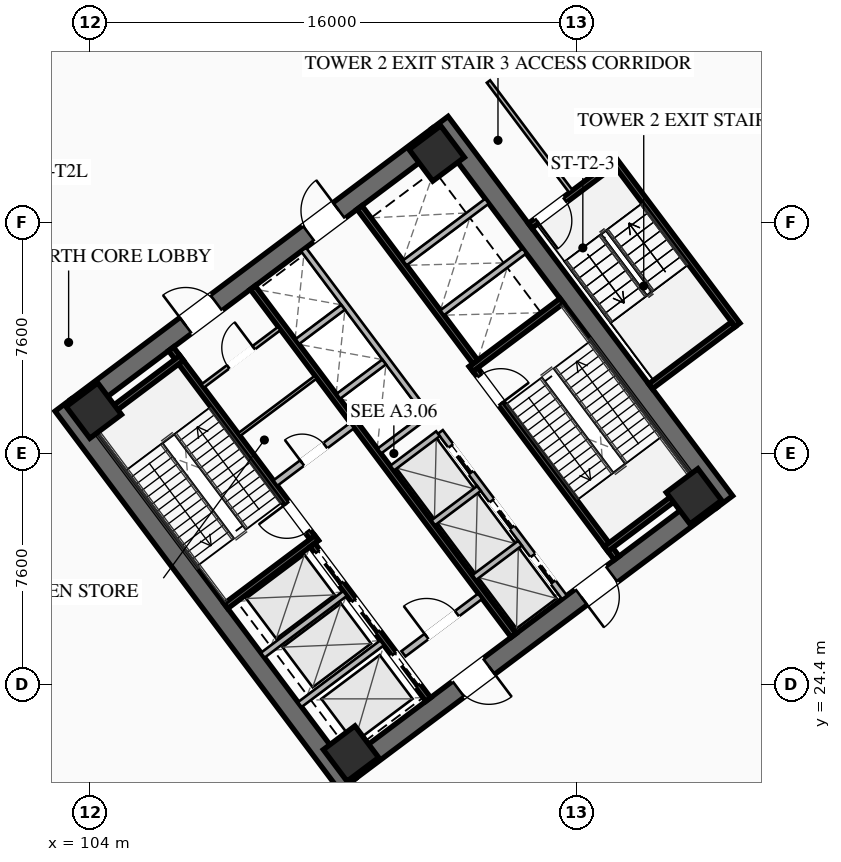
"""IFC4 building model, lengths in metres.
Left out: names, types, materials, properties, quantities, classifications, styles, units other than length and angle.
Written with IfcOpenShell. Run it as: python <this file> out.ifc"""

import sys

from ifc_helpers import new_model, si_unit, direction, frame, frame_2d, origin, origin_2d, place, context, subcontext, project, spatial, rectangle, hollow_rectangle, extrude, element, fill, save


model = new_model("IFC4")
c1 = context("Model", 3, precision=1e-05, world=origin(), true_north=direction((0.0, 1.0)))
c2 = subcontext(c1, "Body", "Model", "MODEL_VIEW")
j1 = project(units=[si_unit("LENGTHUNIT", "METRE"), si_unit("PLANEANGLEUNIT", "RADIAN")], contexts=[c1])
p1 = place(None, origin())
s1 = spatial("IfcSite", under=j1, at=p1, CompositionType="ELEMENT")
p2 = place(p1, origin())
s2 = spatial("IfcBuilding", under=s1, at=p2, CompositionType="ELEMENT")
p3 = place(p2, frame((0.0, 0.0, 10.2)))
s3 = spatial("IfcBuildingStorey", under=s2, at=p3, CompositionType="ELEMENT", Elevation=10.2)
for number, where, z_axis, x_axis in (
    (1, (112.476, 21.107, 0.0), (0.0, 0.0, 1.0), (-0.6, 0.8, 0.0)),
    (2, (115.524, 42.893, 0.0), (0.0, 0.0, 1.0), (0.6, -0.8, 0.0)),
):
    element("IfcWall", number, at=place(p3, frame(where, z_axis=z_axis, x_axis=x_axis)), inside=s3, PredefinedType="SHEAR", context=c2, shape_type="SweptSolid", body=[
        extrude(rectangle(XDim=15.6, YDim=0.65, at=frame_2d((7.8, 0.0))), origin(), (0.0, 0.0, 1.0), 5.4),
    ])
p4 = place(p3, frame((124.429, 30.478, 0.0), z_axis=(0.0, 0.0, 1.0), x_axis=(-0.799998028465, -0.600002628705, 0.0)))
e3 = element("IfcWall", 3, at=p4, inside=s3, PredefinedType="SHEAR", context=c2, shape_type="SweptSolid", body=[
    extrude(rectangle(XDim=14.86, YDim=0.65, at=frame_2d((7.43, 0.0))), origin(), (0.0, 0.0, 1.0), 5.4),
])
p5 = place(p4, frame((9.13, 0.0, 0.0)))
e4 = element("IfcOpeningElement", 4, at=p5, cuts=e3, PredefinedType="OPENING", context=c2, shape_type="SweptSolid", body=[
    extrude(rectangle(XDim=1.25, YDim=2.25, at=frame_2d((0.625, 1.125))), frame((0.0, 0.335, 0.0), z_axis=(0.0, -1.0, 0.0), x_axis=(1.0, 0.0, 0.0)), (0.0, 0.0, 1.0), 0.67),
])
p6 = place(p4, frame((4.08, 0.0, 0.0)))
e5 = element("IfcOpeningElement", 5, at=p6, cuts=e3, PredefinedType="OPENING", context=c2, shape_type="SweptSolid", body=[
    extrude(rectangle(XDim=1.25, YDim=2.25, at=frame_2d((0.625, 1.125))), frame((0.0, 0.335, 0.0), z_axis=(0.0, -1.0, 0.0), x_axis=(1.0, 0.0, 0.0)), (0.0, 0.0, 1.0), 0.67),
])
p7 = place(p3, frame((103.571, 33.522, 0.0), z_axis=(0.0, 0.0, 1.0), x_axis=(0.799998028465, 0.600002628705, 0.0)))
e6 = element("IfcWall", 6, at=p7, inside=s3, PredefinedType="SHEAR", context=c2, shape_type="SweptSolid", body=[
    extrude(rectangle(XDim=14.86, YDim=0.65, at=frame_2d((7.43, 0.0))), origin(), (0.0, 0.0, 1.0), 5.4),
])
p8 = place(p7, frame((4.48, 0.0, 0.0)))
e7 = element("IfcOpeningElement", 7, at=p8, cuts=e6, PredefinedType="OPENING", context=c2, shape_type="SweptSolid", body=[
    extrude(rectangle(XDim=1.25, YDim=2.25, at=frame_2d((0.625, 1.125))), frame((0.0, 0.335, 0.0), z_axis=(0.0, -1.0, 0.0), x_axis=(1.0, 0.0, 0.0)), (0.0, 0.0, 1.0), 0.67),
])
p9 = place(p7, frame((9.53, 0.0, 0.0)))
e8 = element("IfcOpeningElement", 8, at=p9, cuts=e6, PredefinedType="OPENING", context=c2, shape_type="SweptSolid", body=[
    extrude(rectangle(XDim=1.25, YDim=2.25, at=frame_2d((0.625, 1.125))), frame((0.0, 0.335, 0.0), z_axis=(0.0, -1.0, 0.0), x_axis=(1.0, 0.0, 0.0)), (0.0, 0.0, 1.0), 0.67),
])
for number, where, z_axis, x_axis in (
    (9, (112.59, 22.13, 0.0), (0.0, 0.0, 1.0), (0.8, 0.6, 0.0)),
    (10, (123.87, 30.59, 0.0), (0.0, 0.0, 1.0), (0.8, 0.6, 0.0)),
    (11, (115.41, 41.87, 0.0), (0.0, 0.0, 1.0), (0.8, 0.6, 0.0)),
    (12, (104.13, 33.41, 0.0), (0.0, 0.0, 1.0), (0.8, 0.6, 0.0)),
):
    element("IfcColumn", number, at=place(p3, frame(where, z_axis=z_axis, x_axis=x_axis)), inside=s3, PredefinedType="COLUMN", context=c2, shape_type="SweptSolid", body=[
        extrude(hollow_rectangle(XDim=1.3, YDim=1.3, WallThickness=0.05, at=origin_2d()), origin(), (0.0, 0.0, 1.0), 5.14),
    ])
p10 = place(p3, frame((111.44, 29.08, 0.0), z_axis=(0.0, 0.0, 1.0), x_axis=(-0.600009827119, 0.799992629566, 0.0)))
e13 = element("IfcWall", 13, at=p10, inside=s3, PredefinedType="SHEAR", context=c2, shape_type="SweptSolid", body=[
    extrude(rectangle(XDim=7.95, YDim=0.2, at=frame_2d((3.975, 0.0))), origin(), (0.0, 0.0, 1.0), 5.14),
])
p11 = place(p10, frame((0.45, 0.0, 0.0)))
e14 = element("IfcOpeningElement", 14, at=p11, cuts=e13, PredefinedType="OPENING", context=c2, shape_type="SweptSolid", body=[
    extrude(rectangle(XDim=1.15, YDim=2.2, at=frame_2d((0.575, 1.1))), frame((0.0, 0.11, 0.0), z_axis=(0.0, -1.0, 0.0), x_axis=(1.0, 0.0, 0.0)), (0.0, 0.0, 1.0), 0.22),
])
for number, where, z_axis, x_axis in (
    (15, (108.476, 26.982, 0.0), (0.0, 0.0, 1.0), (0.8, 0.6, 0.0)),
    (16, (104.036, 32.902, 0.0), (0.0, 0.0, 1.0), (0.8, 0.6, 0.0)),
):
    element("IfcWall", number, at=place(p3, frame(where, z_axis=z_axis, x_axis=x_axis)), inside=s3, PredefinedType="SHEAR", context=c2, shape_type="SweptSolid", body=[
        extrude(rectangle(XDim=3.73, YDim=0.2, at=frame_2d((1.865, 0.0))), origin(), (0.0, 0.0, 1.0), 5.14),
    ])
p12 = place(p3, frame((116.56, 34.92, 0.0), z_axis=(0.0, 0.0, 1.0), x_axis=(0.600009827119, -0.799992629566, 0.0)))
e17 = element("IfcWall", 17, at=p12, inside=s3, PredefinedType="SHEAR", context=c2, shape_type="SweptSolid", body=[
    extrude(rectangle(XDim=7.95, YDim=0.2, at=frame_2d((3.975, 0.0))), origin(), (0.0, 0.0, 1.0), 5.14),
])
p13 = place(p12, frame((0.45, 0.0, 0.0)))
e18 = element("IfcOpeningElement", 18, at=p13, cuts=e17, PredefinedType="OPENING", context=c2, shape_type="SweptSolid", body=[
    extrude(rectangle(XDim=1.15, YDim=2.2, at=frame_2d((0.575, 1.1))), frame((0.0, 0.11, 0.0), z_axis=(0.0, -1.0, 0.0), x_axis=(1.0, 0.0, 0.0)), (0.0, 0.0, 1.0), 0.22),
])
for number, where, z_axis, x_axis in (
    (19, (116.54, 34.78, 0.0), (0.0, 0.0, 1.0), (0.8, 0.6, 0.0)),
    (20, (120.98, 28.86, 0.0), (0.0, 0.0, 1.0), (0.8, 0.6, 0.0)),
):
    element("IfcWall", number, at=place(p3, frame(where, z_axis=z_axis, x_axis=x_axis)), inside=s3, PredefinedType="SHEAR", context=c2, shape_type="SweptSolid", body=[
        extrude(rectangle(XDim=3.73, YDim=0.2, at=frame_2d((1.865, 0.0))), origin(), (0.0, 0.0, 1.0), 5.14),
    ])
p14 = place(p3, frame((117.938, 26.016, 0.0), z_axis=(0.0, 0.0, 1.0), x_axis=(-0.600005463273, 0.799995902516, 0.0)))
e21 = element("IfcWall", 21, at=p14, inside=s3, PredefinedType="SHEAR", context=c2, shape_type="SweptSolid", body=[
    extrude(rectangle(XDim=14.3, YDim=0.2, at=frame_2d((7.15, 0.0))), origin(), (0.0, 0.0, 1.0), 5.14),
])
p15 = place(p3, frame((110.104, 31.028, 0.0), z_axis=(0.0, 0.0, 1.0), x_axis=(0.800018601094, 0.59997519774, 0.0)))
e22 = element("IfcWall", 22, at=p15, inside=s3, PredefinedType="SOLIDWALL", context=c2, shape_type="SweptSolid", body=[
    extrude(rectangle(XDim=3.15, YDim=0.22, at=frame_2d((1.575, 0.0))), origin(), (0.0, 0.0, 1.0), 2.71),
])
p16 = place(p15, frame((1.1, 0.0, 0.0)))
e23 = element("IfcOpeningElement", 23, at=p16, cuts=e22, PredefinedType="OPENING", context=c2, shape_type="SweptSolid", body=[
    extrude(rectangle(XDim=0.95, YDim=2.05, at=frame_2d((0.475, 1.025))), frame((0.0, 0.12, 0.0), z_axis=(0.0, -1.0, 0.0), x_axis=(1.0, 0.0, 0.0)), (0.0, 0.0, 1.0), 0.24),
])
p17 = place(p3, frame((114.316, 25.412, 0.0), z_axis=(0.0, 0.0, 1.0), x_axis=(0.800018601094, 0.59997519774, 0.0)))
e24 = element("IfcWall", 24, at=p17, inside=s3, PredefinedType="SOLIDWALL", context=c2, shape_type="SweptSolid", body=[
    extrude(rectangle(XDim=3.15, YDim=0.22, at=frame_2d((1.575, 0.0))), origin(), (0.0, 0.0, 1.0), 2.71),
])
p18 = place(p17, frame((0.95, 0.0, 0.0)))
e25 = element("IfcOpeningElement", 25, at=p18, cuts=e24, PredefinedType="OPENING", context=c2, shape_type="SweptSolid", body=[
    extrude(rectangle(XDim=1.25, YDim=2.25, at=frame_2d((0.625, 1.125))), frame((0.0, 0.12, 0.0), z_axis=(0.0, -1.0, 0.0), x_axis=(1.0, 0.0, 0.0)), (0.0, 0.0, 1.0), 0.24),
])
p19 = place(p3, frame((115.13, 23.91, 0.0), z_axis=(0.0, 0.0, 1.0), x_axis=(-0.599975393228, 0.800018454488, 0.0)))
e26 = element("IfcWall", 26, at=p19, inside=s3, PredefinedType="SHEAR", context=c2, shape_type="SweptSolid", body=[
    extrude(rectangle(XDim=6.35, YDim=0.2, at=frame_2d((3.175, 0.0))), origin(), (0.0, 0.0, 1.0), 5.14),
])
p20 = place(p19, frame((4.775, 0.0, 0.0)))
e27 = element("IfcOpeningElement", 27, at=p20, cuts=e26, PredefinedType="OPENING", context=c2, shape_type="SweptSolid", body=[
    extrude(rectangle(XDim=1.3, YDim=2.25, at=frame_2d((0.65, 1.125))), frame((0.0, 0.11, 0.0), z_axis=(0.0, -1.0, 0.0), x_axis=(1.0, 0.0, 0.0)), (0.0, 0.0, 1.0), 0.22),
])
p21 = place(p19, frame((2.775, 0.0, 0.0)))
e28 = element("IfcOpeningElement", 28, at=p21, cuts=e26, PredefinedType="OPENING", context=c2, shape_type="SweptSolid", body=[
    extrude(rectangle(XDim=1.3, YDim=2.25, at=frame_2d((0.65, 1.125))), frame((0.0, 0.11, 0.0), z_axis=(0.0, -1.0, 0.0), x_axis=(1.0, 0.0, 0.0)), (0.0, 0.0, 1.0), 0.22),
])
p22 = place(p19, frame((0.575, 0.0, 0.0)))
e29 = element("IfcOpeningElement", 29, at=p22, cuts=e26, PredefinedType="OPENING", context=c2, shape_type="SweptSolid", body=[
    extrude(rectangle(XDim=1.3, YDim=2.25, at=frame_2d((0.65, 1.125))), frame((0.0, 0.11, 0.0), z_axis=(0.0, -1.0, 0.0), x_axis=(1.0, 0.0, 0.0)), (0.0, 0.0, 1.0), 0.22),
])
for number, where, z_axis, x_axis in (
    (30, (110.906, 23.742, 0.0), (0.0, 0.0, 1.0), (0.8, 0.6, 0.0)),
    (31, (109.688, 25.366, 0.0), (0.0, 0.0, 1.0), (0.8, 0.6, 0.0)),
):
    element("IfcWall", number, at=place(p3, frame(where, z_axis=z_axis, x_axis=x_axis)), inside=s3, PredefinedType="SOLIDWALL", context=c2, shape_type="SweptSolid", body=[
        extrude(rectangle(XDim=3.38, YDim=0.2, at=frame_2d((1.69, 0.0))), origin(), (0.0, 0.0, 1.0), 5.14),
    ])
p23 = place(p3, frame((112.87, 40.09, 0.0), z_axis=(0.0, 0.0, 1.0), x_axis=(0.599975393228, -0.800018454488, 0.0)))
e32 = element("IfcWall", 32, at=p23, inside=s3, PredefinedType="SHEAR", context=c2, shape_type="SweptSolid", body=[
    extrude(rectangle(XDim=6.35, YDim=0.2, at=frame_2d((3.175, 0.0))), origin(), (0.0, 0.0, 1.0), 5.14),
])
for number, where, z_axis, x_axis in (
    (33, (115.59, 36.63, 0.0), (0.0, 0.0, 1.0), (0.8, 0.6, 0.0)),
    (34, (114.36, 38.27, 0.0), (0.0, 0.0, 1.0), (0.8, 0.6, 0.0)),
):
    element("IfcWall", number, at=place(p3, frame(where, z_axis=z_axis, x_axis=x_axis)), inside=s3, PredefinedType="SOLIDWALL", context=c2, shape_type="SweptSolid", body=[
        extrude(rectangle(XDim=3.38, YDim=0.2, at=frame_2d((1.69, 0.0))), origin(), (0.0, 0.0, 1.0), 5.14),
    ])
p24 = place(p3, frame((107.71, 34.22, 0.0), z_axis=(0.0, 0.0, 1.0), x_axis=(0.799981399002, 0.60002480053, 0.0)))
e35 = element("IfcWall", 35, at=p24, inside=s3, PredefinedType="PARTITIONING", context=c2, shape_type="SweptSolid", body=[
    extrude(rectangle(XDim=3.15, YDim=0.135, at=frame_2d((1.575, 0.0))), origin(), (0.0, 0.0, 1.0), 2.71),
])
p25 = place(p24, frame((1.05, 0.0, 0.0)))
e36 = element("IfcOpeningElement", 36, at=p25, cuts=e35, PredefinedType="OPENING", context=c2, shape_type="SweptSolid", body=[
    extrude(rectangle(XDim=1.05, YDim=2.2, at=frame_2d((0.525, 1.1))), frame((0.0, 0.077, 0.0), z_axis=(0.0, -1.0, 0.0), x_axis=(1.0, 0.0, 0.0)), (0.0, 0.0, 1.0), 0.155),
])
p26 = place(p3, frame((108.91, 32.62, 0.0), z_axis=(0.0, 0.0, 1.0), x_axis=(0.800018601094, 0.59997519774, 0.0)))
e37 = element("IfcWall", 37, at=p26, inside=s3, PredefinedType="PARTITIONING", context=c2, shape_type="SweptSolid", body=[
    extrude(rectangle(XDim=3.15, YDim=0.11, at=frame_2d((1.575, 0.0))), origin(), (0.0, 0.0, 1.0), 2.71),
])
p27 = place(p3, frame((119.61, 27.27, 0.0), z_axis=(0.0, 0.0, 1.0), x_axis=(-0.600011488909, 0.79999138319, 0.0)))
e38 = element("IfcWall", 38, at=p27, inside=s3, PredefinedType="SOLIDWALL", context=c2, shape_type="SweptSolid", body=[
    extrude(rectangle(XDim=6.8, YDim=0.2, at=frame_2d((3.4, 0.0))), origin(), (0.0, 0.0, 1.0), 5.14),
])
p28 = place(p27, frame((0.625, 0.0, 0.0)))
e39 = element("IfcOpeningElement", 39, at=p28, cuts=e38, PredefinedType="OPENING", context=c2, shape_type="SweptSolid", body=[
    extrude(rectangle(XDim=1.1, YDim=2.2, at=frame_2d((0.55, 1.1))), frame((0.0, 0.11, 0.0), z_axis=(0.0, -1.0, 0.0), x_axis=(1.0, 0.0, 0.0)), (0.0, 0.0, 1.0), 0.22),
])
p29 = place(p27, frame((2.875, 0.0, 0.0)))
e40 = element("IfcOpeningElement", 40, at=p29, cuts=e38, PredefinedType="OPENING", context=c2, shape_type="SweptSolid", body=[
    extrude(rectangle(XDim=1.1, YDim=2.2, at=frame_2d((0.55, 1.1))), frame((0.0, 0.11, 0.0), z_axis=(0.0, -1.0, 0.0), x_axis=(1.0, 0.0, 0.0)), (0.0, 0.0, 1.0), 0.22),
])
p30 = place(p27, frame((5.125, 0.0, 0.0)))
e41 = element("IfcOpeningElement", 41, at=p30, cuts=e38, PredefinedType="OPENING", context=c2, shape_type="SweptSolid", body=[
    extrude(rectangle(XDim=1.1, YDim=2.2, at=frame_2d((0.55, 1.1))), frame((0.0, 0.11, 0.0), z_axis=(0.0, -1.0, 0.0), x_axis=(1.0, 0.0, 0.0)), (0.0, 0.0, 1.0), 0.22),
])
p31 = place(p3, frame((116.646, 27.922, 0.0), z_axis=(0.0, 0.0, 1.0), x_axis=(0.8, 0.6, 0.0)))
e42 = element("IfcWall", 42, at=p31, inside=s3, PredefinedType="SOLIDWALL", context=c2, shape_type="SweptSolid", body=[
    extrude(rectangle(XDim=1.88, YDim=0.2, at=frame_2d((0.94, 0.0))), origin(), (0.0, 0.0, 1.0), 5.14),
])
p32 = place(p3, frame((115.296, 29.722, 0.0), z_axis=(0.0, 0.0, 1.0), x_axis=(0.799984418148, 0.600020775241, 0.0)))
e43 = element("IfcWall", 43, at=p32, inside=s3, PredefinedType="SOLIDWALL", context=c2, shape_type="SweptSolid", body=[
    extrude(rectangle(XDim=1.88, YDim=0.2, at=frame_2d((0.94, 0.0))), origin(), (0.0, 0.0, 1.0), 5.14),
])
p33 = place(p3, frame((113.946, 31.522, 0.0), z_axis=(0.0, 0.0, 1.0), x_axis=(0.8, 0.6, 0.0)))
e44 = element("IfcWall", 44, at=p33, inside=s3, PredefinedType="SOLIDWALL", context=c2, shape_type="SweptSolid", body=[
    extrude(rectangle(XDim=1.88, YDim=0.2, at=frame_2d((0.94, 0.0))), origin(), (0.0, 0.0, 1.0), 5.14),
])
p34 = place(p3, frame((115.11, 33.27, 0.0), z_axis=(0.0, 0.0, 1.0), x_axis=(-0.600011488909, 0.79999138319, 0.0)))
e45 = element("IfcWall", 45, at=p34, inside=s3, PredefinedType="SOLIDWALL", context=c2, shape_type="SweptSolid", body=[
    extrude(rectangle(XDim=6.8, YDim=0.2, at=frame_2d((3.4, 0.0))), origin(), (0.0, 0.0, 1.0), 5.14),
])
p35 = place(p3, frame((113.526, 32.082, 0.0), z_axis=(0.0, 0.0, 1.0), x_axis=(0.800046745961, 0.599937666993, 0.0)))
e46 = element("IfcWall", 46, at=p35, inside=s3, PredefinedType="SOLIDWALL", context=c2, shape_type="SweptSolid", body=[
    extrude(rectangle(XDim=1.88, YDim=0.2, at=frame_2d((0.94, 0.0))), origin(), (0.0, 0.0, 1.0), 5.14),
])
p36 = place(p3, frame((112.176, 33.882, 0.0), z_axis=(0.0, 0.0, 1.0), x_axis=(0.8, 0.6, 0.0)))
e47 = element("IfcWall", 47, at=p36, inside=s3, PredefinedType="SOLIDWALL", context=c2, shape_type="SweptSolid", body=[
    extrude(rectangle(XDim=1.88, YDim=0.2, at=frame_2d((0.94, 0.0))), origin(), (0.0, 0.0, 1.0), 5.14),
])
p37 = place(p3, frame((110.826, 35.682, 0.0), z_axis=(0.0, 0.0, 1.0), x_axis=(0.799984418148, 0.600020775241, 0.0)))
e48 = element("IfcWall", 48, at=p37, inside=s3, PredefinedType="SOLIDWALL", context=c2, shape_type="SweptSolid", body=[
    extrude(rectangle(XDim=1.88, YDim=0.2, at=frame_2d((0.94, 0.0))), origin(), (0.0, 0.0, 1.0), 5.14),
])
p38 = place(p3, frame((125.304, 36.228, 0.0), z_axis=(0.0, 0.0, 1.0), x_axis=(-0.59998851072, 0.800008616831, 0.0)))
e49 = element("IfcWall", 49, at=p38, inside=s3, PredefinedType="SHEAR", context=c2, shape_type="SweptSolid", body=[
    extrude(rectangle(XDim=6.8, YDim=0.2, at=frame_2d((3.4, 0.0))), origin(), (0.0, 0.0, 1.0), 5.14),
])
p39 = place(p3, frame((121.204, 41.528, 0.0), z_axis=(0.0, 0.0, 1.0), x_axis=(-0.800017232136, -0.599977023131, 0.0)))
e50 = element("IfcWall", 50, at=p39, inside=s3, PredefinedType="SHEAR", context=c2, shape_type="SweptSolid", body=[
    extrude(rectangle(XDim=3.4, YDim=0.2, at=frame_2d((1.7, 0.0))), origin(), (0.0, 0.0, 1.0), 5.14),
])
p40 = place(p39, frame((1.975, 0.0, 0.0)))
e51 = element("IfcOpeningElement", 51, at=p40, cuts=e50, PredefinedType="OPENING", context=c2, shape_type="SweptSolid", body=[
    extrude(rectangle(XDim=1.15, YDim=2.2, at=frame_2d((0.575, 1.1))), frame((0.0, 0.11, 0.0), z_axis=(0.0, -1.0, 0.0), x_axis=(1.0, 0.0, 0.0)), (0.0, 0.0, 1.0), 0.22),
])
p41 = place(p3, frame((122.444, 34.208, 0.0), z_axis=(0.0, 0.0, 1.0), x_axis=(0.79999138319, 0.600011488909, 0.0)))
e52 = element("IfcWall", 52, at=p41, inside=s3, PredefinedType="SHEAR", context=c2, shape_type="SweptSolid", body=[
    extrude(rectangle(XDim=3.4, YDim=0.2, at=frame_2d((1.7, 0.0))), origin(), (0.0, 0.0, 1.0), 5.14),
])
p42 = place(p3, frame((119.824, 40.618, 0.0), z_axis=(0.0, 0.0, 1.0), x_axis=(-0.59999135767, 0.800006481675, 0.0)))
e53 = element("IfcWall", 53, at=p42, inside=s3, PredefinedType="PARTITIONING", context=c2, shape_type="SweptSolid", body=[
    extrude(rectangle(XDim=4.52, YDim=0.135, at=frame_2d((2.26, 0.0))), origin(), (0.0, 0.0, 1.0), 2.71),
])
p43 = place(p8, origin())
e54 = element("IfcDoor", 54, at=p43, inside=s3, OperationType="SINGLE_SWING_LEFT", PredefinedType="DOOR", context=c2, shape_type="SweptSolid", body=[
    extrude(rectangle(XDim=1.25, YDim=2.25, at=frame_2d((0.625, 1.125))), frame((0.0, 0.025, 0.0), z_axis=(0.0, -1.0, 0.0), x_axis=(1.0, 0.0, 0.0)), (0.0, 0.0, 1.0), 0.05),
])
fill(e7, e54)
p44 = place(p9, origin())
e55 = element("IfcDoor", 55, at=p44, inside=s3, OperationType="SINGLE_SWING_RIGHT", PredefinedType="DOOR", context=c2, shape_type="SweptSolid", body=[
    extrude(rectangle(XDim=1.25, YDim=2.25, at=frame_2d((0.625, 1.125))), frame((0.0, 0.025, 0.0), z_axis=(0.0, -1.0, 0.0), x_axis=(1.0, 0.0, 0.0)), (0.0, 0.0, 1.0), 0.05),
])
fill(e8, e55)
p45 = place(p5, origin())
e56 = element("IfcDoor", 56, at=p45, inside=s3, OperationType="SINGLE_SWING_LEFT", PredefinedType="DOOR", context=c2, shape_type="SweptSolid", body=[
    extrude(rectangle(XDim=1.25, YDim=2.25, at=frame_2d((0.625, 1.125))), frame((0.0, 0.025, 0.0), z_axis=(0.0, -1.0, 0.0), x_axis=(1.0, 0.0, 0.0)), (0.0, 0.0, 1.0), 0.05),
])
fill(e4, e56)
p46 = place(p6, origin())
e57 = element("IfcDoor", 57, at=p46, inside=s3, OperationType="SINGLE_SWING_RIGHT", PredefinedType="DOOR", context=c2, shape_type="SweptSolid", body=[
    extrude(rectangle(XDim=1.25, YDim=2.25, at=frame_2d((0.625, 1.125))), frame((0.0, 0.025, 0.0), z_axis=(0.0, -1.0, 0.0), x_axis=(1.0, 0.0, 0.0)), (0.0, 0.0, 1.0), 0.05),
])
fill(e5, e57)
p47 = place(p11, origin())
e58 = element("IfcDoor", 58, at=p47, inside=s3, OperationType="SINGLE_SWING_RIGHT", PredefinedType="DOOR", context=c2, shape_type="SweptSolid", body=[
    extrude(rectangle(XDim=1.15, YDim=2.2, at=frame_2d((0.575, 1.1))), frame((0.0, 0.025, 0.0), z_axis=(0.0, -1.0, 0.0), x_axis=(1.0, 0.0, 0.0)), (0.0, 0.0, 1.0), 0.05),
])
fill(e14, e58)
p48 = place(p13, origin())
e59 = element("IfcDoor", 59, at=p48, inside=s3, OperationType="SINGLE_SWING_RIGHT", PredefinedType="DOOR", context=c2, shape_type="SweptSolid", body=[
    extrude(rectangle(XDim=1.15, YDim=2.2, at=frame_2d((0.575, 1.1))), frame((0.0, 0.025, 0.0), z_axis=(0.0, -1.0, 0.0), x_axis=(1.0, 0.0, 0.0)), (0.0, 0.0, 1.0), 0.05),
])
fill(e18, e59)
p49 = place(p18, origin())
e60 = element("IfcDoor", 60, at=p49, inside=s3, OperationType="SINGLE_SWING_LEFT", PredefinedType="DOOR", context=c2, shape_type="SweptSolid", body=[
    extrude(rectangle(XDim=1.25, YDim=2.25, at=frame_2d((0.625, 1.125))), frame((0.0, 0.025, 0.0), z_axis=(0.0, -1.0, 0.0), x_axis=(1.0, 0.0, 0.0)), (0.0, 0.0, 1.0), 0.05),
])
fill(e25, e60)
p50 = place(p25, origin())
e61 = element("IfcDoor", 61, at=p50, inside=s3, OperationType="SINGLE_SWING_RIGHT", PredefinedType="DOOR", context=c2, shape_type="SweptSolid", body=[
    extrude(rectangle(XDim=1.05, YDim=2.2, at=frame_2d((0.525, 1.1))), frame((0.0, 0.025, 0.0), z_axis=(0.0, -1.0, 0.0), x_axis=(1.0, 0.0, 0.0)), (0.0, 0.0, 1.0), 0.05),
])
fill(e36, e61)
p51 = place(p16, origin())
e62 = element("IfcDoor", 62, at=p51, inside=s3, OperationType="SINGLE_SWING_LEFT", PredefinedType="DOOR", context=c2, shape_type="SweptSolid", body=[
    extrude(rectangle(XDim=0.95, YDim=2.05, at=frame_2d((0.475, 1.025))), frame((0.0, 0.025, 0.0), z_axis=(0.0, -1.0, 0.0), x_axis=(1.0, 0.0, 0.0)), (0.0, 0.0, 1.0), 0.05),
])
fill(e23, e62)
p52 = place(p40, origin())
e63 = element("IfcDoor", 63, at=p52, inside=s3, OperationType="SINGLE_SWING_RIGHT", PredefinedType="DOOR", context=c2, shape_type="SweptSolid", body=[
    extrude(rectangle(XDim=1.15, YDim=2.2, at=frame_2d((0.575, 1.1))), frame((0.0, 0.025, 0.0), z_axis=(0.0, -1.0, 0.0), x_axis=(1.0, 0.0, 0.0)), (0.0, 0.0, 1.0), 0.05),
])
fill(e51, e63)
p53 = place(p20, origin())
e64 = element("IfcDoor", 64, at=p53, inside=s3, OperationType="SLIDING_TO_LEFT", PredefinedType="DOOR", context=c2, shape_type="SweptSolid", body=[
    extrude(rectangle(XDim=1.3, YDim=2.25, at=frame_2d((0.65, 1.125))), frame((0.0, 0.025, 0.0), z_axis=(0.0, -1.0, 0.0), x_axis=(1.0, 0.0, 0.0)), (0.0, 0.0, 1.0), 0.05),
])
fill(e27, e64)
p54 = place(p21, origin())
e65 = element("IfcDoor", 65, at=p54, inside=s3, OperationType="SLIDING_TO_LEFT", PredefinedType="DOOR", context=c2, shape_type="SweptSolid", body=[
    extrude(rectangle(XDim=1.3, YDim=2.25, at=frame_2d((0.65, 1.125))), frame((0.0, 0.025, 0.0), z_axis=(0.0, -1.0, 0.0), x_axis=(1.0, 0.0, 0.0)), (0.0, 0.0, 1.0), 0.05),
])
fill(e28, e65)
p55 = place(p22, origin())
e66 = element("IfcDoor", 66, at=p55, inside=s3, OperationType="SLIDING_TO_LEFT", PredefinedType="DOOR", context=c2, shape_type="SweptSolid", body=[
    extrude(rectangle(XDim=1.3, YDim=2.25, at=frame_2d((0.65, 1.125))), frame((0.0, 0.025, 0.0), z_axis=(0.0, -1.0, 0.0), x_axis=(1.0, 0.0, 0.0)), (0.0, 0.0, 1.0), 0.05),
])
fill(e29, e66)
p56 = place(p28, origin())
e67 = element("IfcDoor", 67, at=p56, inside=s3, OperationType="SLIDING_TO_LEFT", PredefinedType="DOOR", context=c2, shape_type="SweptSolid", body=[
    extrude(rectangle(XDim=1.1, YDim=2.2, at=frame_2d((0.55, 1.1))), frame((0.0, 0.025, 0.0), z_axis=(0.0, -1.0, 0.0), x_axis=(1.0, 0.0, 0.0)), (0.0, 0.0, 1.0), 0.05),
])
fill(e39, e67)
p57 = place(p29, origin())
e68 = element("IfcDoor", 68, at=p57, inside=s3, OperationType="SLIDING_TO_LEFT", PredefinedType="DOOR", context=c2, shape_type="SweptSolid", body=[
    extrude(rectangle(XDim=1.1, YDim=2.2, at=frame_2d((0.55, 1.1))), frame((0.0, 0.025, 0.0), z_axis=(0.0, -1.0, 0.0), x_axis=(1.0, 0.0, 0.0)), (0.0, 0.0, 1.0), 0.05),
])
fill(e40, e68)
p58 = place(p30, origin())
e69 = element("IfcDoor", 69, at=p58, inside=s3, OperationType="SLIDING_TO_LEFT", PredefinedType="DOOR", context=c2, shape_type="SweptSolid", body=[
    extrude(rectangle(XDim=1.1, YDim=2.2, at=frame_2d((0.55, 1.1))), frame((0.0, 0.025, 0.0), z_axis=(0.0, -1.0, 0.0), x_axis=(1.0, 0.0, 0.0)), (0.0, 0.0, 1.0), 0.05),
])
fill(e41, e69)
save(model, sys.argv[1])
